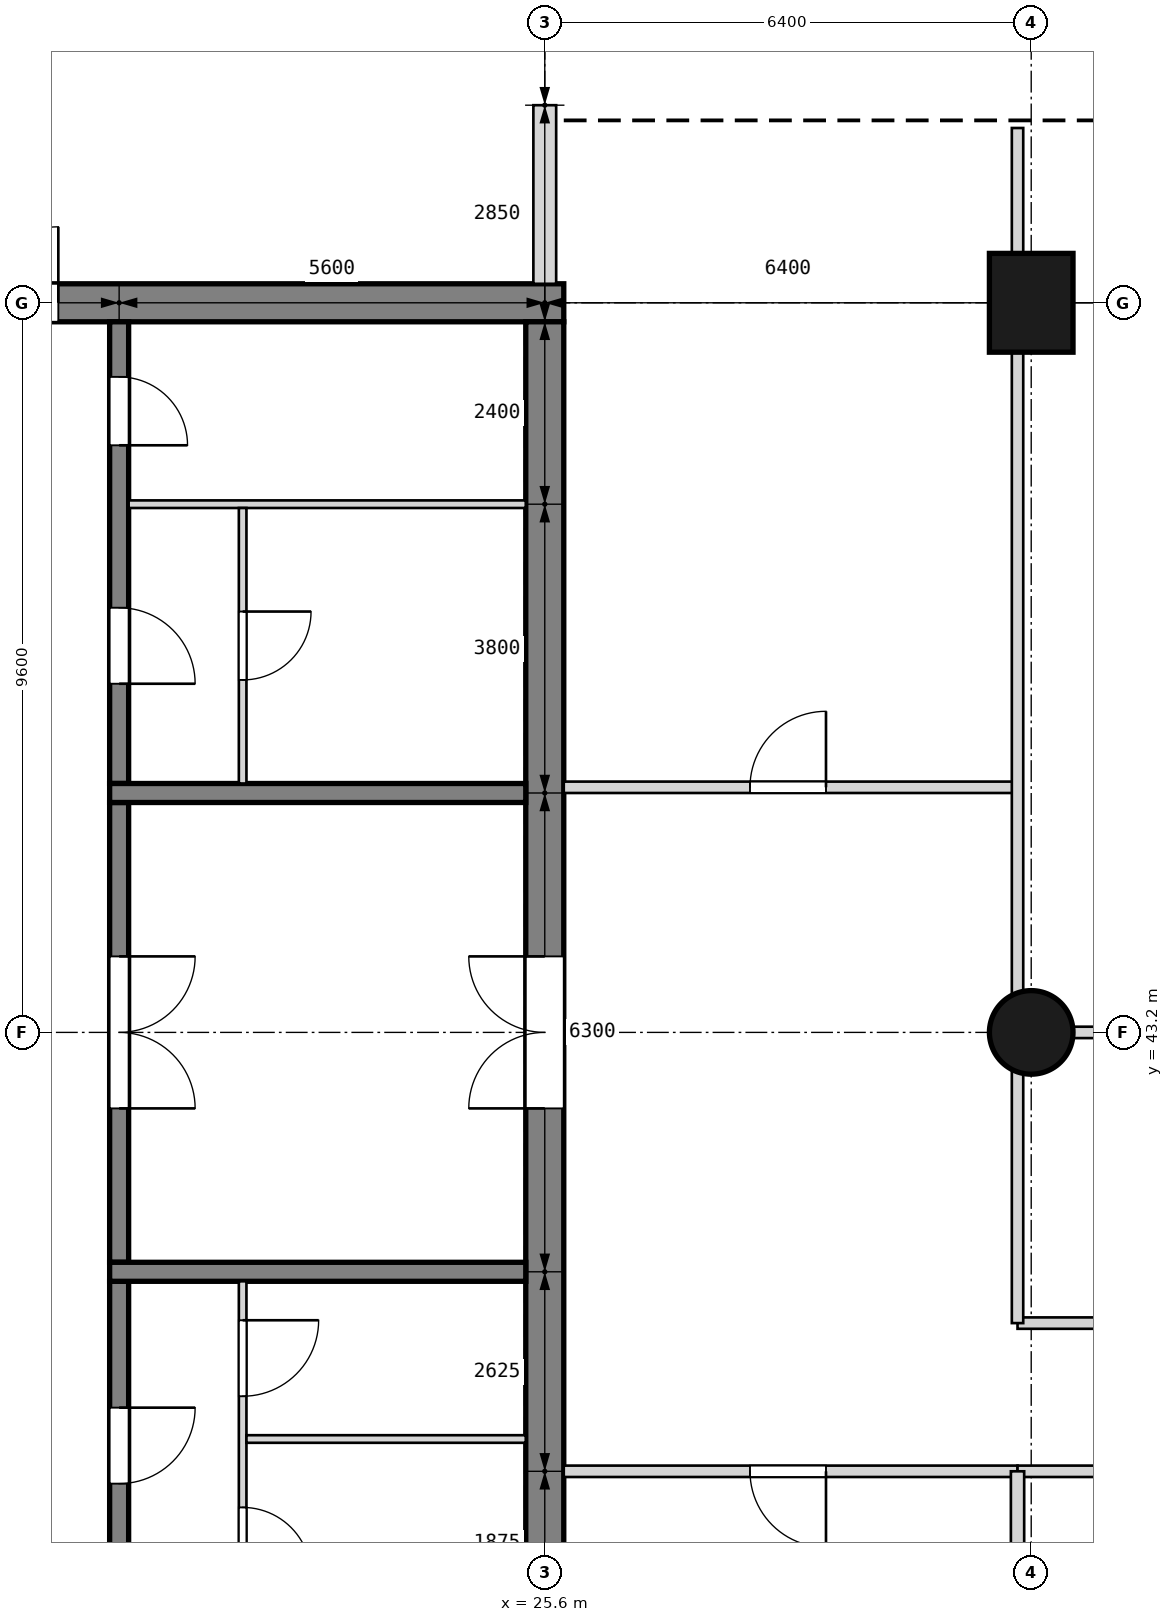
"""IFC4 building model, lengths in metres.
Left out: names, types, materials, properties, quantities, classifications, styles, units other than length and angle.
Written with IfcOpenShell. Run it as: python <this file> out.ifc"""

import sys

from ifc_helpers import new_model, si_unit, direction, frame, frame_2d, origin, origin_2d, place, context, subcontext, project, spatial, rectangle, circle, extrude, element, fill, save


model = new_model("IFC4")
c1 = context("Model", 3, precision=1e-05, world=origin(), true_north=direction((0.0, 1.0)))
c2 = subcontext(c1, "Body", "Model", "MODEL_VIEW")
j1 = project(units=[si_unit("LENGTHUNIT", "METRE"), si_unit("PLANEANGLEUNIT", "RADIAN")], contexts=[c1])
p1 = place(None, origin())
s1 = spatial("IfcSite", under=j1, at=p1, CompositionType="ELEMENT")
p2 = place(p1, origin())
s2 = spatial("IfcBuilding", under=s1, at=p2, CompositionType="ELEMENT")
p3 = place(p2, frame((0.0, 0.0, 8.4)))
s3 = spatial("IfcBuildingStorey", under=s2, at=p3, CompositionType="ELEMENT", Elevation=8.4)
p4 = place(p3, frame((12.55, 52.8, 0.0), z_axis=(0.0, 0.0, 1.0), x_axis=(1.0, 0.0, 0.0)))
e1 = element("IfcWall", 1, at=p4, inside=s3, PredefinedType="SHEAR", context=c2, shape_type="SweptSolid", body=[
    extrude(rectangle(XDim=13.3, YDim=0.5, at=frame_2d((6.65, 0.0))), origin(), (0.0, 0.0, 1.0), 4.5),
])
p5 = place(p4, frame((1.85, 0.0, 1.0)))
e2 = element("IfcOpeningElement", 2, at=p5, cuts=e1, PredefinedType="OPENING", context=c2, shape_type="SweptSolid", body=[
    extrude(rectangle(XDim=0.4, YDim=2.0, at=frame_2d((0.2, 1.0))), frame((0.0, 0.26, 0.0), z_axis=(0.0, -1.0, 0.0), x_axis=(1.0, 0.0, 0.0)), (0.0, 0.0, 1.0), 0.52),
])
p6 = place(p4, frame((4.65, 0.0, 0.0)))
e3 = element("IfcOpeningElement", 3, at=p6, cuts=e1, PredefinedType="OPENING", context=c2, shape_type="SweptSolid", body=[
    extrude(rectangle(XDim=2.0, YDim=2.1, at=frame_2d((1.0, 1.05))), frame((0.0, 0.26, 0.0), z_axis=(0.0, -1.0, 0.0), x_axis=(1.0, 0.0, 0.0)), (0.0, 0.0, 1.0), 0.52),
])
p7 = place(p3, frame((25.6, 33.85, 0.0), z_axis=(0.0, 0.0, 1.0), x_axis=(0.0, 1.0, 0.0)))
e4 = element("IfcWall", 4, at=p7, inside=s3, PredefinedType="SHEAR", context=c2, shape_type="SweptSolid", body=[
    extrude(rectangle(XDim=18.7, YDim=0.5, at=frame_2d((9.35, 0.0))), origin(), (0.0, 0.0, 1.0), 4.5),
])
p8 = place(p7, frame((8.35, 0.0, 0.0)))
e5 = element("IfcOpeningElement", 5, at=p8, cuts=e4, PredefinedType="OPENING", context=c2, shape_type="SweptSolid", body=[
    extrude(rectangle(XDim=2.0, YDim=2.1, at=frame_2d((1.0, 1.05))), frame((0.0, 0.26, 0.0), z_axis=(0.0, -1.0, 0.0), x_axis=(1.0, 0.0, 0.0)), (0.0, 0.0, 1.0), 0.52),
])
p9 = place(p3, frame((32.0, 43.2, 0.0), z_axis=(0.0, 0.0, 1.0), x_axis=(1.0, 0.0, 0.0)))
e6 = element("IfcColumn", 6, at=p9, inside=s3, PredefinedType="COLUMN", context=c2, shape_type="SweptSolid", body=[
    extrude(circle(Radius=0.55, at=origin_2d()), origin(), (0.0, 0.0, 1.0), 4.5),
])
p10 = place(p3, frame((32.0, 52.8, 0.0), z_axis=(0.0, 0.0, 1.0), x_axis=(1.0, 0.0, 0.0)))
e7 = element("IfcColumn", 7, at=p10, inside=s3, PredefinedType="COLUMN", context=c2, shape_type="SweptSolid", body=[
    extrude(rectangle(XDim=1.1, YDim=1.3, at=origin_2d()), origin(), (0.0, 0.0, 1.0), 4.5),
])
p11 = place(p3, frame((25.6, 53.05, 0.0), z_axis=(0.0, 0.0, 1.0), x_axis=(0.0, 1.0, 0.0)))
e8 = element("IfcWall", 8, at=p11, inside=s3, PredefinedType="SOLIDWALL", context=c2, shape_type="SweptSolid", body=[
    extrude(rectangle(XDim=2.35, YDim=0.3, at=frame_2d((1.175, 0.0))), origin(), (0.0, 0.0, 1.0), 3.48),
])
p12 = place(p3, frame((20.0, 33.85, 0.0), z_axis=(0.0, 0.0, 1.0), x_axis=(0.0, 1.0, 0.0)))
e9 = element("IfcWall", 9, at=p12, inside=s3, PredefinedType="SOLIDWALL", context=c2, shape_type="SweptSolid", body=[
    extrude(rectangle(XDim=6.075, YDim=0.25, at=frame_2d((3.038, 0.0))), origin(), (0.0, 0.0, 1.0), 4.2),
])
p13 = place(p12, frame((0.425, 0.0, 0.0)))
e10 = element("IfcOpeningElement", 10, at=p13, cuts=e9, PredefinedType="OPENING", context=c2, shape_type="SweptSolid", body=[
    extrude(rectangle(XDim=0.8, YDim=2.1, at=frame_2d((0.4, 1.05))), frame((0.0, 0.135, 0.0), z_axis=(0.0, -1.0, 0.0), x_axis=(1.0, 0.0, 0.0)), (0.0, 0.0, 1.0), 0.27),
])
p14 = place(p12, frame((3.413, 0.0, 0.0)))
e11 = element("IfcOpeningElement", 11, at=p14, cuts=e9, PredefinedType="OPENING", context=c2, shape_type="SweptSolid", body=[
    extrude(rectangle(XDim=1.0, YDim=2.1, at=frame_2d((0.5, 1.05))), frame((0.0, 0.135, 0.0), z_axis=(0.0, -1.0, 0.0), x_axis=(1.0, 0.0, 0.0)), (0.0, 0.0, 1.0), 0.27),
])
p15 = place(p3, frame((20.0, 40.175, 0.0), z_axis=(0.0, 0.0, 1.0), x_axis=(0.0, 1.0, 0.0)))
e12 = element("IfcWall", 12, at=p15, inside=s3, PredefinedType="SOLIDWALL", context=c2, shape_type="SweptSolid", body=[
    extrude(rectangle(XDim=6.05, YDim=0.25, at=frame_2d((3.025, 0.0))), origin(), (0.0, 0.0, 1.0), 4.2),
])
p16 = place(p15, frame((2.025, 0.0, 0.0)))
e13 = element("IfcOpeningElement", 13, at=p16, cuts=e12, PredefinedType="OPENING", context=c2, shape_type="SweptSolid", body=[
    extrude(rectangle(XDim=2.0, YDim=2.1, at=frame_2d((1.0, 1.05))), frame((0.0, 0.135, 0.0), z_axis=(0.0, -1.0, 0.0), x_axis=(1.0, 0.0, 0.0)), (0.0, 0.0, 1.0), 0.27),
])
p17 = place(p3, frame((20.0, 46.475, 0.0), z_axis=(0.0, 0.0, 1.0), x_axis=(0.0, 1.0, 0.0)))
e14 = element("IfcWall", 14, at=p17, inside=s3, PredefinedType="SOLIDWALL", context=c2, shape_type="SweptSolid", body=[
    extrude(rectangle(XDim=6.075, YDim=0.25, at=frame_2d((3.038, 0.0))), origin(), (0.0, 0.0, 1.0), 4.2),
])
p18 = place(p17, frame((1.312, 0.0, 0.0)))
e15 = element("IfcOpeningElement", 15, at=p18, cuts=e14, PredefinedType="OPENING", context=c2, shape_type="SweptSolid", body=[
    extrude(rectangle(XDim=1.0, YDim=2.1, at=frame_2d((0.5, 1.05))), frame((0.0, 0.135, 0.0), z_axis=(0.0, -1.0, 0.0), x_axis=(1.0, 0.0, 0.0)), (0.0, 0.0, 1.0), 0.27),
])
p19 = place(p17, frame((4.45, 0.0, 0.0)))
e16 = element("IfcOpeningElement", 16, at=p19, cuts=e14, PredefinedType="OPENING", context=c2, shape_type="SweptSolid", body=[
    extrude(rectangle(XDim=0.9, YDim=2.1, at=frame_2d((0.45, 1.05))), frame((0.0, 0.135, 0.0), z_axis=(0.0, -1.0, 0.0), x_axis=(1.0, 0.0, 0.0)), (0.0, 0.0, 1.0), 0.27),
])
for number, where, z_axis, x_axis in (
    (17, (19.875, 40.05, 0.0), (0.0, 0.0, 1.0), (1.0, 0.0, 0.0)),
    (18, (19.875, 46.35, 0.0), (0.0, 0.0, 1.0), (1.0, 0.0, 0.0)),
):
    element("IfcWall", number, at=place(p3, frame(where, z_axis=z_axis, x_axis=x_axis)), inside=s3, PredefinedType="SOLIDWALL", context=c2, shape_type="SweptSolid", body=[
        extrude(rectangle(XDim=5.475, YDim=0.25, at=frame_2d((2.738, 0.0))), origin(), (0.0, 0.0, 1.0), 4.2),
    ])
p20 = place(p3, frame((21.625, 35.6, 0.0), z_axis=(0.0, 0.0, 1.0), x_axis=(0.0, 1.0, 0.0)))
e19 = element("IfcWall", 19, at=p20, inside=s3, PredefinedType="PARTITIONING", context=c2, shape_type="SweptSolid", body=[
    extrude(rectangle(XDim=4.325, YDim=0.1, at=frame_2d((2.163, 0.0))), origin(), (0.0, 0.0, 1.0), 4.2),
])
p21 = place(p20, frame((0.45, 0.0, 0.0)))
e20 = element("IfcOpeningElement", 20, at=p21, cuts=e19, PredefinedType="OPENING", context=c2, shape_type="SweptSolid", body=[
    extrude(rectangle(XDim=0.9, YDim=2.1, at=frame_2d((0.45, 1.05))), frame((0.0, 0.06, 0.0), z_axis=(0.0, -1.0, 0.0), x_axis=(1.0, 0.0, 0.0)), (0.0, 0.0, 1.0), 0.12),
])
p22 = place(p20, frame((2.812, 0.0, 0.0)))
e21 = element("IfcOpeningElement", 21, at=p22, cuts=e19, PredefinedType="OPENING", context=c2, shape_type="SweptSolid", body=[
    extrude(rectangle(XDim=1.0, YDim=2.1, at=frame_2d((0.5, 1.05))), frame((0.0, 0.06, 0.0), z_axis=(0.0, -1.0, 0.0), x_axis=(1.0, 0.0, 0.0)), (0.0, 0.0, 1.0), 0.12),
])
p23 = place(p3, frame((21.675, 37.85, 0.0), z_axis=(0.0, 0.0, 1.0), x_axis=(1.0, 0.0, 0.0)))
e22 = element("IfcWall", 22, at=p23, inside=s3, PredefinedType="PARTITIONING", context=c2, shape_type="SweptSolid", body=[
    extrude(rectangle(XDim=3.675, YDim=0.1, at=frame_2d((1.837, 0.0))), origin(), (0.0, 0.0, 1.0), 4.2),
])
p24 = place(p3, frame((20.125, 50.15, 0.0), z_axis=(0.0, 0.0, 1.0), x_axis=(1.0, 0.0, 0.0)))
e23 = element("IfcWall", 23, at=p24, inside=s3, PredefinedType="PARTITIONING", context=c2, shape_type="SweptSolid", body=[
    extrude(rectangle(XDim=5.225, YDim=0.1, at=frame_2d((2.613, 0.0))), origin(), (0.0, 0.0, 1.0), 4.2),
])
p25 = place(p3, frame((21.625, 46.475, 0.0), z_axis=(0.0, 0.0, 1.0), x_axis=(0.0, 1.0, 0.0)))
e24 = element("IfcWall", 24, at=p25, inside=s3, PredefinedType="PARTITIONING", context=c2, shape_type="SweptSolid", body=[
    extrude(rectangle(XDim=3.625, YDim=0.1, at=frame_2d((1.812, 0.0))), origin(), (0.0, 0.0, 1.0), 4.2),
])
p26 = place(p25, frame((1.363, 0.0, 0.0)))
e25 = element("IfcOpeningElement", 25, at=p26, cuts=e24, PredefinedType="OPENING", context=c2, shape_type="SweptSolid", body=[
    extrude(rectangle(XDim=0.9, YDim=2.1, at=frame_2d((0.45, 1.05))), frame((0.0, 0.06, 0.0), z_axis=(0.0, -1.0, 0.0), x_axis=(1.0, 0.0, 0.0)), (0.0, 0.0, 1.0), 0.12),
])
p27 = place(p3, frame((25.85, 37.425, 0.0), z_axis=(0.0, 0.0, 1.0), x_axis=(1.0, 0.0, 0.0)))
e26 = element("IfcWall", 26, at=p27, inside=s3, PredefinedType="PARTITIONING", context=c2, shape_type="SweptSolid", body=[
    extrude(rectangle(XDim=5.97, YDim=0.15, at=frame_2d((2.985, 0.0))), origin(), (0.0, 0.0, 1.0), 4.28),
])
p28 = place(p27, frame((2.45, 0.0, 0.0)))
e27 = element("IfcOpeningElement", 27, at=p28, cuts=e26, PredefinedType="OPENING", context=c2, shape_type="SweptSolid", body=[
    extrude(rectangle(XDim=1.0, YDim=2.1, at=frame_2d((0.5, 1.05))), frame((0.0, 0.085, 0.0), z_axis=(0.0, -1.0, 0.0), x_axis=(1.0, 0.0, 0.0)), (0.0, 0.0, 1.0), 0.17),
])
p29 = place(p3, frame((31.82, 37.425, 0.0), z_axis=(0.0, 0.0, 1.0), x_axis=(1.0, 0.0, 0.0)))
e28 = element("IfcWall", 28, at=p29, inside=s3, PredefinedType="PARTITIONING", context=c2, shape_type="SweptSolid", body=[
    extrude(rectangle(XDim=6.4, YDim=0.15, at=frame_2d((3.2, 0.0))), origin(), (0.0, 0.0, 1.0), 4.28),
])
p30 = place(p29, frame((2.68, 0.0, 0.0)))
e29 = element("IfcOpeningElement", 29, at=p30, cuts=e28, PredefinedType="OPENING", context=c2, shape_type="SweptSolid", body=[
    extrude(rectangle(XDim=1.0, YDim=2.1, at=frame_2d((0.5, 1.05))), frame((0.0, 0.085, 0.0), z_axis=(0.0, -1.0, 0.0), x_axis=(1.0, 0.0, 0.0)), (0.0, 0.0, 1.0), 0.17),
])
p31 = place(p3, frame((31.82, 34.23, 0.0), z_axis=(0.0, 0.0, 1.0), x_axis=(0.0, 1.0, 0.0)))
e30 = element("IfcWall", 30, at=p31, inside=s3, PredefinedType="PARTITIONING", context=c2, shape_type="SweptSolid", body=[
    extrude(rectangle(XDim=3.195, YDim=0.175, at=frame_2d((1.598, 0.0))), origin(), (0.0, 0.0, 1.0), 3.38),
])
p32 = place(p3, frame((31.82, 39.375, 0.0), z_axis=(0.0, 0.0, 1.0), x_axis=(1.0, 0.0, 0.0)))
e31 = element("IfcWall", 31, at=p32, inside=s3, PredefinedType="PARTITIONING", context=c2, shape_type="SweptSolid", body=[
    extrude(rectangle(XDim=25.96, YDim=0.15, at=frame_2d((12.98, 0.0))), origin(), (0.0, 0.0, 1.0), 4.28),
])
p33 = place(p32, frame((5.63, 0.0, 0.0)))
e32 = element("IfcOpeningElement", 32, at=p33, cuts=e31, PredefinedType="OPENING", context=c2, shape_type="SweptSolid", body=[
    extrude(rectangle(XDim=1.8, YDim=2.1, at=frame_2d((0.9, 1.05))), frame((0.0, 0.085, 0.0), z_axis=(0.0, -1.0, 0.0), x_axis=(1.0, 0.0, 0.0)), (0.0, 0.0, 1.0), 0.17),
])
p34 = place(p32, frame((18.53, 0.0, 0.0)))
e33 = element("IfcOpeningElement", 33, at=p34, cuts=e31, PredefinedType="OPENING", context=c2, shape_type="SweptSolid", body=[
    extrude(rectangle(XDim=1.8, YDim=2.1, at=frame_2d((0.9, 1.05))), frame((0.0, 0.085, 0.0), z_axis=(0.0, -1.0, 0.0), x_axis=(1.0, 0.0, 0.0)), (0.0, 0.0, 1.0), 0.17),
])
p35 = place(p3, frame((31.82, 43.2, 0.0), z_axis=(0.0, 0.0, 1.0), x_axis=(1.0, 0.0, 0.0)))
e34 = element("IfcWall", 34, at=p35, inside=s3, PredefinedType="PARTITIONING", context=c2, shape_type="SweptSolid", body=[
    extrude(rectangle(XDim=25.96, YDim=0.15, at=frame_2d((12.98, 0.0))), origin(), (0.0, 0.0, 1.0), 3.48),
])
p36 = place(p35, frame((3.175, 0.0, 0.0)))
e35 = element("IfcOpeningElement", 35, at=p36, cuts=e34, PredefinedType="OPENING", context=c2, shape_type="SweptSolid", body=[
    extrude(rectangle(XDim=1.8, YDim=2.1, at=frame_2d((0.9, 1.05))), frame((0.0, 0.085, 0.0), z_axis=(0.0, -1.0, 0.0), x_axis=(1.0, 0.0, 0.0)), (0.0, 0.0, 1.0), 0.17),
])
p37 = place(p35, frame((10.325, 0.0, 0.0)))
e36 = element("IfcOpeningElement", 36, at=p37, cuts=e34, PredefinedType="OPENING", context=c2, shape_type="SweptSolid", body=[
    extrude(rectangle(XDim=1.8, YDim=2.1, at=frame_2d((0.9, 1.05))), frame((0.0, 0.085, 0.0), z_axis=(0.0, -1.0, 0.0), x_axis=(1.0, 0.0, 0.0)), (0.0, 0.0, 1.0), 0.17),
])
p38 = place(p35, frame((17.518, 0.0, 0.0)))
e37 = element("IfcOpeningElement", 37, at=p38, cuts=e34, PredefinedType="OPENING", context=c2, shape_type="SweptSolid", body=[
    extrude(rectangle(XDim=1.0, YDim=2.1, at=frame_2d((0.5, 1.05))), frame((0.0, 0.085, 0.0), z_axis=(0.0, -1.0, 0.0), x_axis=(1.0, 0.0, 0.0)), (0.0, 0.0, 1.0), 0.17),
])
p39 = place(p35, frame((22.607, 0.0, 0.0)))
e38 = element("IfcOpeningElement", 38, at=p39, cuts=e34, PredefinedType="OPENING", context=c2, shape_type="SweptSolid", body=[
    extrude(rectangle(XDim=1.8, YDim=2.1, at=frame_2d((0.9, 1.05))), frame((0.0, 0.085, 0.0), z_axis=(0.0, -1.0, 0.0), x_axis=(1.0, 0.0, 0.0)), (0.0, 0.0, 1.0), 0.17),
])
p40 = place(p3, frame((25.85, 46.425, 0.0), z_axis=(0.0, 0.0, 1.0), x_axis=(1.0, 0.0, 0.0)))
e39 = element("IfcWall", 39, at=p40, inside=s3, PredefinedType="PARTITIONING", context=c2, shape_type="SweptSolid", body=[
    extrude(rectangle(XDim=5.97, YDim=0.15, at=frame_2d((2.985, 0.0))), origin(), (0.0, 0.0, 1.0), 4.28),
])
p41 = place(p40, frame((2.45, 0.0, 0.0)))
e40 = element("IfcOpeningElement", 40, at=p41, cuts=e39, PredefinedType="OPENING", context=c2, shape_type="SweptSolid", body=[
    extrude(rectangle(XDim=1.0, YDim=2.1, at=frame_2d((0.5, 1.05))), frame((0.0, 0.085, 0.0), z_axis=(0.0, -1.0, 0.0), x_axis=(1.0, 0.0, 0.0)), (0.0, 0.0, 1.0), 0.17),
])
p42 = place(p3, frame((31.82, 39.375, 0.0), z_axis=(0.0, 0.0, 1.0), x_axis=(0.0, 1.0, 0.0)))
e41 = element("IfcWall", 41, at=p42, inside=s3, PredefinedType="PARTITIONING", context=c2, shape_type="SweptSolid", body=[
    extrude(rectangle(XDim=3.325, YDim=0.15, at=frame_2d((1.663, 0.0))), origin(), (0.0, 0.0, 1.0), 3.38),
])
p43 = place(p3, frame((31.82, 43.7, 0.0), z_axis=(0.0, 0.0, 1.0), x_axis=(0.0, 1.0, 0.0)))
e42 = element("IfcWall", 42, at=p43, inside=s3, PredefinedType="PARTITIONING", context=c2, shape_type="SweptSolid", body=[
    extrude(rectangle(XDim=8.47, YDim=0.15, at=frame_2d((4.235, 0.0))), origin(), (0.0, 0.0, 1.0), 3.38),
])
p44 = place(p3, frame((31.82, 53.43, 0.0), z_axis=(0.0, 0.0, 1.0), x_axis=(0.0, 1.0, 0.0)))
e43 = element("IfcWall", 43, at=p44, inside=s3, PredefinedType="PARTITIONING", context=c2, shape_type="SweptSolid", body=[
    extrude(rectangle(XDim=1.67, YDim=0.15, at=frame_2d((0.835, 0.0))), origin(), (0.0, 0.0, 1.0), 3.38),
])
p45 = place(p16, frame((2.0, 0.0, 0.0), z_axis=(0.0, 0.0, 1.0), x_axis=(-1.0, 0.0, 0.0)))
e44 = element("IfcDoor", 44, at=p45, inside=s3, OperationType="DOUBLE_DOOR_SINGLE_SWING", PredefinedType="DOOR", context=c2, shape_type="SweptSolid", body=[
    extrude(rectangle(XDim=2.0, YDim=2.1, at=frame_2d((1.0, 1.05))), frame((0.0, 0.025, 0.0), z_axis=(0.0, -1.0, 0.0), x_axis=(1.0, 0.0, 0.0)), (0.0, 0.0, 1.0), 0.05),
])
fill(e13, e44)
p46 = place(p8, origin())
e45 = element("IfcDoor", 45, at=p46, inside=s3, OperationType="DOUBLE_DOOR_SINGLE_SWING", PredefinedType="DOOR", context=c2, shape_type="SweptSolid", body=[
    extrude(rectangle(XDim=2.0, YDim=2.1, at=frame_2d((1.0, 1.05))), frame((0.0, 0.025, 0.0), z_axis=(0.0, -1.0, 0.0), x_axis=(1.0, 0.0, 0.0)), (0.0, 0.0, 1.0), 0.05),
])
fill(e5, e45)
p47 = place(p14, frame((1.0, 0.0, 0.0), z_axis=(0.0, 0.0, 1.0), x_axis=(-1.0, 0.0, 0.0)))
e46 = element("IfcDoor", 46, at=p47, inside=s3, OperationType="SINGLE_SWING_LEFT", PredefinedType="DOOR", context=c2, shape_type="SweptSolid", body=[
    extrude(rectangle(XDim=1.0, YDim=2.1, at=frame_2d((0.5, 1.05))), frame((0.0, 0.025, 0.0), z_axis=(0.0, -1.0, 0.0), x_axis=(1.0, 0.0, 0.0)), (0.0, 0.0, 1.0), 0.05),
])
fill(e11, e46)
p48 = place(p21, frame((0.9, 0.0, 0.0), z_axis=(0.0, 0.0, 1.0), x_axis=(-1.0, 0.0, 0.0)))
e47 = element("IfcDoor", 47, at=p48, inside=s3, OperationType="SINGLE_SWING_RIGHT", PredefinedType="DOOR", context=c2, shape_type="SweptSolid", body=[
    extrude(rectangle(XDim=0.9, YDim=2.1, at=frame_2d((0.45, 1.05))), frame((0.0, 0.025, 0.0), z_axis=(0.0, -1.0, 0.0), x_axis=(1.0, 0.0, 0.0)), (0.0, 0.0, 1.0), 0.05),
])
fill(e20, e47)
p49 = place(p22, frame((1.0, 0.0, 0.0), z_axis=(0.0, 0.0, 1.0), x_axis=(-1.0, 0.0, 0.0)))
e48 = element("IfcDoor", 48, at=p49, inside=s3, OperationType="SINGLE_SWING_LEFT", PredefinedType="DOOR", context=c2, shape_type="SweptSolid", body=[
    extrude(rectangle(XDim=1.0, YDim=2.1, at=frame_2d((0.5, 1.05))), frame((0.0, 0.025, 0.0), z_axis=(0.0, -1.0, 0.0), x_axis=(1.0, 0.0, 0.0)), (0.0, 0.0, 1.0), 0.05),
])
fill(e21, e48)
p50 = place(p18, frame((1.0, 0.0, 0.0), z_axis=(0.0, 0.0, 1.0), x_axis=(-1.0, 0.0, 0.0)))
e49 = element("IfcDoor", 49, at=p50, inside=s3, OperationType="SINGLE_SWING_RIGHT", PredefinedType="DOOR", context=c2, shape_type="SweptSolid", body=[
    extrude(rectangle(XDim=1.0, YDim=2.1, at=frame_2d((0.5, 1.05))), frame((0.0, 0.025, 0.0), z_axis=(0.0, -1.0, 0.0), x_axis=(1.0, 0.0, 0.0)), (0.0, 0.0, 1.0), 0.05),
])
fill(e15, e49)
p51 = place(p26, frame((0.9, 0.0, 0.0), z_axis=(0.0, 0.0, 1.0), x_axis=(-1.0, 0.0, 0.0)))
e50 = element("IfcDoor", 50, at=p51, inside=s3, OperationType="SINGLE_SWING_LEFT", PredefinedType="DOOR", context=c2, shape_type="SweptSolid", body=[
    extrude(rectangle(XDim=0.9, YDim=2.1, at=frame_2d((0.45, 1.05))), frame((0.0, 0.025, 0.0), z_axis=(0.0, -1.0, 0.0), x_axis=(1.0, 0.0, 0.0)), (0.0, 0.0, 1.0), 0.05),
])
fill(e25, e50)
p52 = place(p19, frame((0.9, 0.0, 0.0), z_axis=(0.0, 0.0, 1.0), x_axis=(-1.0, 0.0, 0.0)))
e51 = element("IfcDoor", 51, at=p52, inside=s3, OperationType="SINGLE_SWING_RIGHT", PredefinedType="DOOR", context=c2, shape_type="SweptSolid", body=[
    extrude(rectangle(XDim=0.9, YDim=2.1, at=frame_2d((0.45, 1.05))), frame((0.0, 0.025, 0.0), z_axis=(0.0, -1.0, 0.0), x_axis=(1.0, 0.0, 0.0)), (0.0, 0.0, 1.0), 0.05),
])
fill(e16, e51)
p53 = place(p6, origin())
e52 = element("IfcDoor", 52, at=p53, inside=s3, OperationType="DOUBLE_DOOR_SINGLE_SWING", PredefinedType="DOOR", context=c2, shape_type="SweptSolid", body=[
    extrude(rectangle(XDim=2.0, YDim=2.1, at=frame_2d((1.0, 1.05))), frame((0.0, 0.025, 0.0), z_axis=(0.0, -1.0, 0.0), x_axis=(1.0, 0.0, 0.0)), (0.0, 0.0, 1.0), 0.05),
])
fill(e3, e52)
p54 = place(p28, frame((1.0, 0.0, 0.0), z_axis=(0.0, 0.0, 1.0), x_axis=(-1.0, 0.0, 0.0)))
e53 = element("IfcDoor", 53, at=p54, inside=s3, OperationType="SINGLE_SWING_LEFT", PredefinedType="DOOR", context=c2, shape_type="SweptSolid", body=[
    extrude(rectangle(XDim=1.0, YDim=2.1, at=frame_2d((0.5, 1.05))), frame((0.0, 0.025, 0.0), z_axis=(0.0, -1.0, 0.0), x_axis=(1.0, 0.0, 0.0)), (0.0, 0.0, 1.0), 0.05),
])
fill(e27, e53)
p55 = place(p41, origin())
e54 = element("IfcDoor", 54, at=p55, inside=s3, OperationType="SINGLE_SWING_RIGHT", PredefinedType="DOOR", context=c2, shape_type="SweptSolid", body=[
    extrude(rectangle(XDim=1.0, YDim=2.1, at=frame_2d((0.5, 1.05))), frame((0.0, 0.025, 0.0), z_axis=(0.0, -1.0, 0.0), x_axis=(1.0, 0.0, 0.0)), (0.0, 0.0, 1.0), 0.05),
])
fill(e40, e54)
save(model, sys.argv[1])
